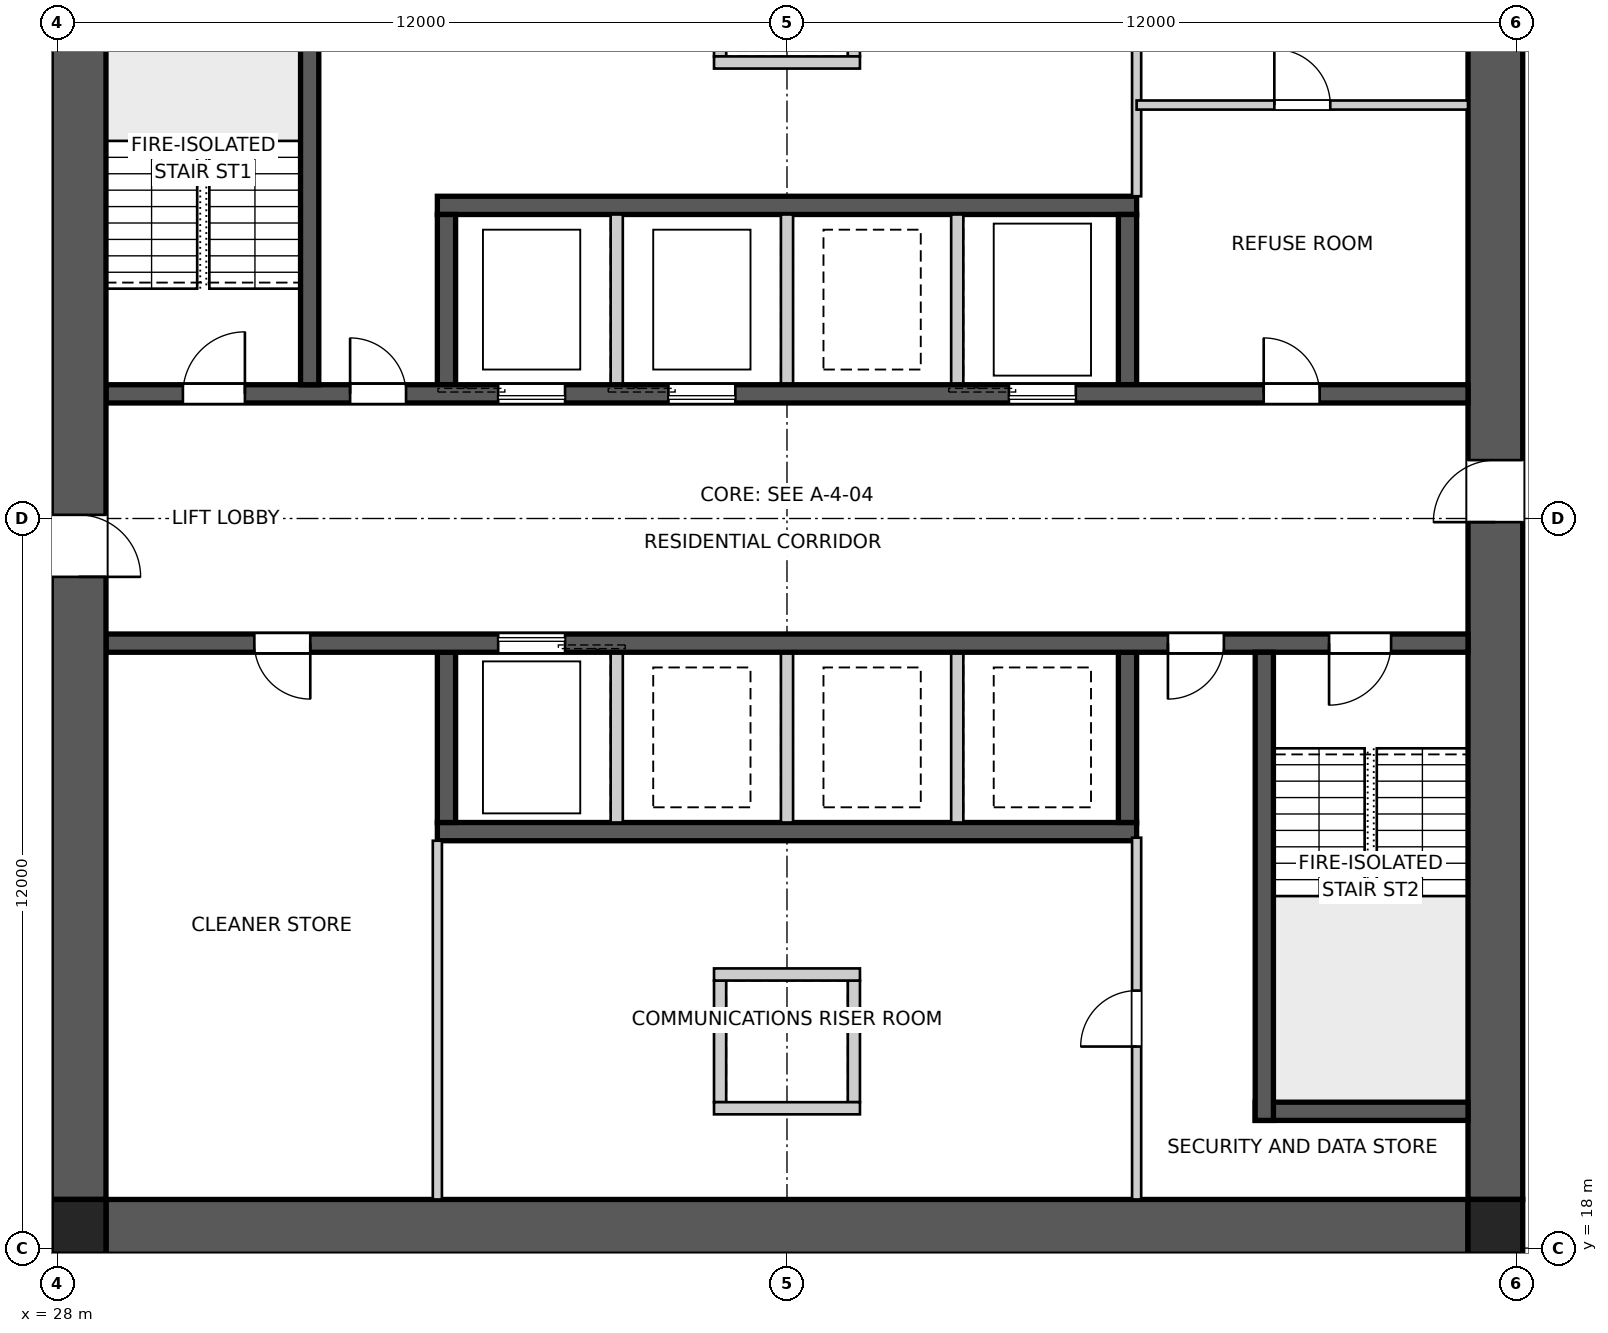
"""IFC4 building model, lengths in metres.
Left out: names, types, materials, properties, quantities, classifications, styles, units other than length and angle.
Written with IfcOpenShell. Run it as: python <this file> out.ifc"""

import sys

from ifc_helpers import new_model, si_unit, direction, frame, frame_2d, origin, origin_2d, place, context, subcontext, project, spatial, polyline, rectangle, outline, extrude, element, fill, save


model = new_model("IFC4")
c1 = context("Model", 3, precision=1e-05, world=origin(), true_north=direction((0.0, 1.0)))
c2 = subcontext(c1, "Body", "Model", "MODEL_VIEW")
j1 = project(units=[si_unit("LENGTHUNIT", "METRE"), si_unit("PLANEANGLEUNIT", "RADIAN")], contexts=[c1])
p1 = place(None, origin())
s1 = spatial("IfcSite", under=j1, at=p1, CompositionType="ELEMENT")
p2 = place(p1, origin())
s2 = spatial("IfcBuilding", under=s1, at=p2, CompositionType="ELEMENT")
p3 = place(p2, frame((0.0, 0.0, 54.0)))
s3 = spatial("IfcBuildingStorey", under=s2, at=p3, CompositionType="ELEMENT", Elevation=54.0)
p4 = place(p3, frame((51.2, 18.35, 0.0), z_axis=(0.0, 0.0, 1.0), x_axis=(-1.0, 0.0, 0.0)))
e1 = element("IfcWall", 1, at=p4, inside=s3, PredefinedType="SHEAR", context=c2, shape_type="SweptSolid", body=[
    extrude(outline(polyline([(0.0, -0.45), (22.4, -0.45), (22.4, -0.025), (22.85, -0.025), (22.85, 0.025), (22.4, 0.025), (22.4, 0.45), (0.0, 0.45), (0.0, 0.025), (-0.45, 0.025), (-0.45, -0.025), (0.0, -0.025), (0.0, -0.45)])), origin(), (0.0, 0.0, 1.0), 3.4),
])
p5 = place(p3, frame((51.65, 18.8, 0.0), z_axis=(0.0, 0.0, 1.0), x_axis=(0.0, 1.0, 0.0)))
e2 = element("IfcWall", 2, at=p5, inside=s3, PredefinedType="SHEAR", context=c2, shape_type="SweptSolid", body=[
    extrude(outline(polyline([(0.0, -0.45), (22.4, -0.45), (22.4, -0.025), (22.85, -0.025), (22.85, 0.025), (22.4, 0.025), (22.4, 0.45), (0.0, 0.45), (0.0, 0.025), (-0.45, 0.025), (-0.45, -0.025), (0.0, -0.025), (0.0, -0.45)])), origin(), (0.0, 0.0, 1.0), 3.4),
])
p6 = place(p5, frame((11.14, 0.0, 0.0)))
e3 = element("IfcOpeningElement", 3, at=p6, cuts=e2, PredefinedType="OPENING", context=c2, shape_type="SweptSolid", body=[
    extrude(rectangle(XDim=1.02, YDim=2.4, at=frame_2d((0.51, 1.2))), frame((0.0, 0.46, 0.0), z_axis=(0.0, -1.0, 0.0), x_axis=(1.0, 0.0, 0.0)), (0.0, 0.0, 1.0), 0.92),
])
p7 = place(p3, frame((28.35, 41.2, 0.0), z_axis=(0.0, 0.0, 1.0), x_axis=(0.0, -1.0, 0.0)))
e4 = element("IfcWall", 4, at=p7, inside=s3, PredefinedType="SHEAR", context=c2, shape_type="SweptSolid", body=[
    extrude(outline(polyline([(0.0, -0.45), (22.4, -0.45), (22.4, -0.025), (22.85, -0.025), (22.85, 0.025), (22.4, 0.025), (22.4, 0.45), (0.0, 0.45), (0.0, 0.025), (-0.45, 0.025), (-0.45, -0.025), (0.0, -0.025), (0.0, -0.45)])), origin(), (0.0, 0.0, 1.0), 3.4),
])
p8 = place(p7, frame((11.14, 0.0, 0.0)))
e5 = element("IfcOpeningElement", 5, at=p8, cuts=e4, PredefinedType="OPENING", context=c2, shape_type="SweptSolid", body=[
    extrude(rectangle(XDim=1.02, YDim=2.4, at=frame_2d((0.51, 1.2))), frame((0.0, 0.46, 0.0), z_axis=(0.0, -1.0, 0.0), x_axis=(1.0, 0.0, 0.0)), (0.0, 0.0, 1.0), 0.92),
])
p9 = place(p3, frame((28.8, 32.05, 0.0), z_axis=(0.0, 0.0, 1.0), x_axis=(1.0, 0.0, 0.0)))
e6 = element("IfcWall", 6, at=p9, inside=s3, PredefinedType="SHEAR", context=c2, shape_type="SweptSolid", body=[
    extrude(rectangle(XDim=22.4, YDim=0.3, at=frame_2d((11.2, 0.0))), origin(), (0.0, 0.0, 1.0), 3.4),
])
p10 = place(p9, frame((19.04, 0.0, 0.0)))
e7 = element("IfcOpeningElement", 7, at=p10, cuts=e6, PredefinedType="OPENING", context=c2, shape_type="SweptSolid", body=[
    extrude(rectangle(XDim=0.92, YDim=2.1, at=frame_2d((0.46, 1.05))), frame((0.0, 0.16, 0.0), z_axis=(0.0, -1.0, 0.0), x_axis=(1.0, 0.0, 0.0)), (0.0, 0.0, 1.0), 0.32),
])
p11 = place(p9, frame((1.265, 0.0, 0.0)))
e8 = element("IfcOpeningElement", 8, at=p11, cuts=e6, PredefinedType="OPENING", context=c2, shape_type="SweptSolid", body=[
    extrude(rectangle(XDim=1.02, YDim=2.1, at=frame_2d((0.51, 1.05))), frame((0.0, 0.16, 0.0), z_axis=(0.0, -1.0, 0.0), x_axis=(1.0, 0.0, 0.0)), (0.0, 0.0, 1.0), 0.32),
])
p12 = place(p9, frame((4.015, 0.0, 0.0)))
e9 = element("IfcOpeningElement", 9, at=p12, cuts=e6, PredefinedType="OPENING", context=c2, shape_type="SweptSolid", body=[
    extrude(rectangle(XDim=0.92, YDim=2.1, at=frame_2d((0.46, 1.05))), frame((0.0, 0.16, 0.0), z_axis=(0.0, -1.0, 0.0), x_axis=(1.0, 0.0, 0.0)), (0.0, 0.0, 1.0), 0.32),
])
p13 = place(p9, frame((6.45, 0.0, 0.0)))
e10 = element("IfcOpeningElement", 10, at=p13, cuts=e6, PredefinedType="OPENING", context=c2, shape_type="SweptSolid", body=[
    extrude(rectangle(XDim=1.1, YDim=2.1, at=frame_2d((0.55, 1.05))), frame((0.0, 0.16, 0.0), z_axis=(0.0, -1.0, 0.0), x_axis=(1.0, 0.0, 0.0)), (0.0, 0.0, 1.0), 0.32),
])
p14 = place(p9, frame((9.25, 0.0, 0.0)))
e11 = element("IfcOpeningElement", 11, at=p14, cuts=e6, PredefinedType="OPENING", context=c2, shape_type="SweptSolid", body=[
    extrude(rectangle(XDim=1.1, YDim=2.1, at=frame_2d((0.55, 1.05))), frame((0.0, 0.16, 0.0), z_axis=(0.0, -1.0, 0.0), x_axis=(1.0, 0.0, 0.0)), (0.0, 0.0, 1.0), 0.32),
])
p15 = place(p9, frame((14.85, 0.0, 0.0)))
e12 = element("IfcOpeningElement", 12, at=p15, cuts=e6, PredefinedType="OPENING", context=c2, shape_type="SweptSolid", body=[
    extrude(rectangle(XDim=1.1, YDim=2.1, at=frame_2d((0.55, 1.05))), frame((0.0, 0.16, 0.0), z_axis=(0.0, -1.0, 0.0), x_axis=(1.0, 0.0, 0.0)), (0.0, 0.0, 1.0), 0.32),
])
p16 = place(p3, frame((51.2, 27.95, 0.0), z_axis=(0.0, 0.0, 1.0), x_axis=(-1.0, 0.0, 0.0)))
e13 = element("IfcWall", 13, at=p16, inside=s3, PredefinedType="SHEAR", context=c2, shape_type="SweptSolid", body=[
    extrude(rectangle(XDim=22.4, YDim=0.3, at=frame_2d((11.2, 0.0))), origin(), (0.0, 0.0, 1.0), 3.4),
])
p17 = place(p16, frame((19.04, 0.0, 0.0)))
e14 = element("IfcOpeningElement", 14, at=p17, cuts=e13, PredefinedType="OPENING", context=c2, shape_type="SweptSolid", body=[
    extrude(rectangle(XDim=0.92, YDim=2.1, at=frame_2d((0.46, 1.05))), frame((0.0, 0.16, 0.0), z_axis=(0.0, -1.0, 0.0), x_axis=(1.0, 0.0, 0.0)), (0.0, 0.0, 1.0), 0.32),
])
p18 = place(p16, frame((1.265, 0.0, 0.0)))
e15 = element("IfcOpeningElement", 15, at=p18, cuts=e13, PredefinedType="OPENING", context=c2, shape_type="SweptSolid", body=[
    extrude(rectangle(XDim=1.02, YDim=2.1, at=frame_2d((0.51, 1.05))), frame((0.0, 0.16, 0.0), z_axis=(0.0, -1.0, 0.0), x_axis=(1.0, 0.0, 0.0)), (0.0, 0.0, 1.0), 0.32),
])
p19 = place(p16, frame((4.015, 0.0, 0.0)))
e16 = element("IfcOpeningElement", 16, at=p19, cuts=e13, PredefinedType="OPENING", context=c2, shape_type="SweptSolid", body=[
    extrude(rectangle(XDim=0.92, YDim=2.1, at=frame_2d((0.46, 1.05))), frame((0.0, 0.16, 0.0), z_axis=(0.0, -1.0, 0.0), x_axis=(1.0, 0.0, 0.0)), (0.0, 0.0, 1.0), 0.32),
])
p20 = place(p16, frame((14.85, 0.0, 0.0)))
e17 = element("IfcOpeningElement", 17, at=p20, cuts=e13, PredefinedType="OPENING", context=c2, shape_type="SweptSolid", body=[
    extrude(rectangle(XDim=1.1, YDim=2.1, at=frame_2d((0.55, 1.05))), frame((0.0, 0.16, 0.0), z_axis=(0.0, -1.0, 0.0), x_axis=(1.0, 0.0, 0.0)), (0.0, 0.0, 1.0), 0.32),
])
for number, where, z_axis, x_axis in (
    (18, (34.25, 35.15, 0.0), (0.0, 0.0, 1.0), (1.0, 0.0, 0.0)),
    (19, (45.75, 24.85, 0.0), (0.0, 0.0, 1.0), (-1.0, 0.0, 0.0)),
):
    element("IfcWall", number, at=place(p3, frame(where, z_axis=z_axis, x_axis=x_axis)), inside=s3, PredefinedType="SHEAR", context=c2, shape_type="SweptSolid", body=[
        extrude(rectangle(XDim=11.5, YDim=0.3, at=frame_2d((5.75, 0.0))), origin(), (0.0, 0.0, 1.0), 3.4),
    ])
for number, where, z_axis, x_axis in (
    (20, (34.4, 32.2, 0.0), (0.0, 0.0, 1.0), (0.0, 1.0, 0.0)),
    (21, (45.6, 27.8, 0.0), (0.0, 0.0, 1.0), (0.0, -1.0, 0.0)),
):
    element("IfcWall", number, at=place(p3, frame(where, z_axis=z_axis, x_axis=x_axis)), inside=s3, PredefinedType="SHEAR", context=c2, shape_type="SweptSolid", body=[
        extrude(rectangle(XDim=2.8, YDim=0.3, at=frame_2d((1.4, 0.0))), origin(), (0.0, 0.0, 1.0), 3.4),
    ])
for number, where, z_axis, x_axis in (
    (22, (37.2, 32.2, 0.0), (0.0, 0.0, 1.0), (0.0, 1.0, 0.0)),
    (23, (42.8, 27.8, 0.0), (0.0, 0.0, 1.0), (0.0, -1.0, 0.0)),
    (24, (40.0, 32.2, 0.0), (0.0, 0.0, 1.0), (0.0, 1.0, 0.0)),
    (25, (40.0, 27.8, 0.0), (0.0, 0.0, 1.0), (0.0, -1.0, 0.0)),
    (26, (42.8, 32.2, 0.0), (0.0, 0.0, 1.0), (0.0, 1.0, 0.0)),
    (27, (37.2, 27.8, 0.0), (0.0, 0.0, 1.0), (0.0, -1.0, 0.0)),
):
    element("IfcWall", number, at=place(p3, frame(where, z_axis=z_axis, x_axis=x_axis)), inside=s3, PredefinedType="SOLIDWALL", context=c2, shape_type="SweptSolid", body=[
        extrude(rectangle(XDim=2.8, YDim=0.2, at=frame_2d((1.4, 0.0))), origin(), (0.0, 0.0, 1.0), 3.4),
    ])
for number, where, z_axis, x_axis in (
    (28, (45.6, 32.2, 0.0), (0.0, 0.0, 1.0), (0.0, 1.0, 0.0)),
    (29, (34.4, 27.8, 0.0), (0.0, 0.0, 1.0), (0.0, -1.0, 0.0)),
):
    element("IfcWall", number, at=place(p3, frame(where, z_axis=z_axis, x_axis=x_axis)), inside=s3, PredefinedType="SHEAR", context=c2, shape_type="SweptSolid", body=[
        extrude(rectangle(XDim=2.8, YDim=0.3, at=frame_2d((1.4, 0.0))), origin(), (0.0, 0.0, 1.0), 3.4),
    ])
for number, where, z_axis, x_axis in (
    (30, (32.15, 32.2, 0.0), (0.0, 0.0, 1.0), (0.0, 1.0, 0.0)),
    (31, (47.85, 27.8, 0.0), (0.0, 0.0, 1.0), (0.0, -1.0, 0.0)),
):
    element("IfcWall", number, at=place(p3, frame(where, z_axis=z_axis, x_axis=x_axis)), inside=s3, PredefinedType="SHEAR", context=c2, shape_type="SweptSolid", body=[
        extrude(rectangle(XDim=7.7, YDim=0.3, at=frame_2d((3.85, 0.0))), origin(), (0.0, 0.0, 1.0), 3.4),
    ])
p21 = place(p3, frame((51.2, 20.25, 0.0), z_axis=(0.0, 0.0, 1.0), x_axis=(-1.0, 0.0, 0.0)))
e32 = element("IfcWall", 32, at=p21, inside=s3, PredefinedType="SHEAR", context=c2, shape_type="SweptSolid", body=[
    extrude(rectangle(XDim=3.5, YDim=0.3, at=frame_2d((1.75, 0.0))), origin(), (0.0, 0.0, 1.0), 3.4),
])
for number, where, z_axis, x_axis in (
    (33, (38.9, 37.6, 0.0), (0.0, 0.0, 1.0), (0.0, 1.0, 0.0)),
    (34, (41.1, 37.6, 0.0), (0.0, 0.0, 1.0), (0.0, 1.0, 0.0)),
):
    element("IfcWall", number, at=place(p3, frame(where, z_axis=z_axis, x_axis=x_axis)), inside=s3, PredefinedType="SOLIDWALL", context=c2, shape_type="SweptSolid", body=[
        extrude(rectangle(XDim=2.0, YDim=0.2, at=frame_2d((1.0, 0.0))), origin(), (0.0, 0.0, 1.0), 3.4),
    ])
p22 = place(p3, frame((38.8, 37.5, 0.0), z_axis=(0.0, 0.0, 1.0), x_axis=(1.0, 0.0, 0.0)))
e35 = element("IfcWall", 35, at=p22, inside=s3, PredefinedType="SOLIDWALL", context=c2, shape_type="SweptSolid", body=[
    extrude(rectangle(XDim=2.4, YDim=0.2, at=frame_2d((1.2, 0.0))), origin(), (0.0, 0.0, 1.0), 3.4),
])
for number, where, z_axis, x_axis in (
    (36, (38.9, 22.4, 0.0), (0.0, 0.0, 1.0), (0.0, -1.0, 0.0)),
    (37, (41.1, 22.4, 0.0), (0.0, 0.0, 1.0), (0.0, -1.0, 0.0)),
):
    element("IfcWall", number, at=place(p3, frame(where, z_axis=z_axis, x_axis=x_axis)), inside=s3, PredefinedType="SOLIDWALL", context=c2, shape_type="SweptSolid", body=[
        extrude(rectangle(XDim=2.0, YDim=0.2, at=frame_2d((1.0, 0.0))), origin(), (0.0, 0.0, 1.0), 3.4),
    ])
for number, where, z_axis, x_axis in (
    (38, (38.8, 22.5, 0.0), (0.0, 0.0, 1.0), (1.0, 0.0, 0.0)),
    (39, (38.8, 20.3, 0.0), (0.0, 0.0, 1.0), (1.0, 0.0, 0.0)),
):
    element("IfcWall", number, at=place(p3, frame(where, z_axis=z_axis, x_axis=x_axis)), inside=s3, PredefinedType="SOLIDWALL", context=c2, shape_type="SweptSolid", body=[
        extrude(rectangle(XDim=2.4, YDim=0.2, at=frame_2d((1.2, 0.0))), origin(), (0.0, 0.0, 1.0), 3.4),
    ])
for number, where, z_axis, x_axis in (
    (40, (28.35, 18.35, 0.0), (0.0, 0.0, 1.0), (1.0, 0.0, 0.0)),
    (41, (51.65, 18.35, 0.0), (0.0, 0.0, 1.0), (1.0, 0.0, 0.0)),
):
    element("IfcColumn", number, at=place(p3, frame(where, z_axis=z_axis, x_axis=x_axis)), inside=s3, PredefinedType="COLUMN", context=c2, shape_type="SweptSolid", body=[
        extrude(rectangle(XDim=0.9, YDim=0.9, at=origin_2d()), origin(), (0.0, 0.0, 1.0), 3.4),
    ])
p23 = place(p3, frame((45.75, 41.2, 0.0), z_axis=(0.0, 0.0, 1.0), x_axis=(0.0, -1.0, 0.0)))
e42 = element("IfcWall", 42, at=p23, inside=s3, PredefinedType="SOLIDWALL", context=c2, shape_type="SweptSolid", body=[
    extrude(rectangle(XDim=5.9, YDim=0.15, at=frame_2d((2.95, 0.0))), origin(), (0.0, 0.0, 1.0), 3.25),
])
p24 = place(p3, frame((45.75, 36.8, 0.0), z_axis=(0.0, 0.0, 1.0), x_axis=(1.0, 0.0, 0.0)))
e43 = element("IfcWall", 43, at=p24, inside=s3, PredefinedType="SOLIDWALL", context=c2, shape_type="SweptSolid", body=[
    extrude(rectangle(XDim=5.45, YDim=0.15, at=frame_2d((2.725, 0.0))), origin(), (0.0, 0.0, 1.0), 3.25),
])
p25 = place(p24, frame((2.265, 0.0, 0.0)))
e44 = element("IfcOpeningElement", 44, at=p25, cuts=e43, PredefinedType="OPENING", context=c2, shape_type="SweptSolid", body=[
    extrude(rectangle(XDim=0.92, YDim=2.1, at=frame_2d((0.46, 1.05))), frame((0.0, 0.085, 0.0), z_axis=(0.0, -1.0, 0.0), x_axis=(1.0, 0.0, 0.0)), (0.0, 0.0, 1.0), 0.17),
])
p26 = place(p3, frame((45.75, 18.8, 0.0), z_axis=(0.0, 0.0, 1.0), x_axis=(0.0, 1.0, 0.0)))
e45 = element("IfcWall", 45, at=p26, inside=s3, PredefinedType="SOLIDWALL", context=c2, shape_type="SweptSolid", body=[
    extrude(rectangle(XDim=5.95, YDim=0.15, at=frame_2d((2.975, 0.0))), origin(), (0.0, 0.0, 1.0), 3.25),
])
p27 = place(p26, frame((2.515, 0.0, 0.0)))
e46 = element("IfcOpeningElement", 46, at=p27, cuts=e45, PredefinedType="OPENING", context=c2, shape_type="SweptSolid", body=[
    extrude(rectangle(XDim=0.92, YDim=2.1, at=frame_2d((0.46, 1.05))), frame((0.0, 0.085, 0.0), z_axis=(0.0, -1.0, 0.0), x_axis=(1.0, 0.0, 0.0)), (0.0, 0.0, 1.0), 0.17),
])
p28 = place(p3, frame((34.25, 18.8, 0.0), z_axis=(0.0, 0.0, 1.0), x_axis=(0.0, 1.0, 0.0)))
e47 = element("IfcWall", 47, at=p28, inside=s3, PredefinedType="SOLIDWALL", context=c2, shape_type="SweptSolid", body=[
    extrude(rectangle(XDim=5.9, YDim=0.15, at=frame_2d((2.95, 0.0))), origin(), (0.0, 0.0, 1.0), 3.25),
])
p29 = place(p10, origin())
e48 = element("IfcDoor", 48, at=p29, inside=s3, OperationType="SINGLE_SWING_LEFT", PredefinedType="DOOR", context=c2, shape_type="SweptSolid", body=[
    extrude(rectangle(XDim=0.92, YDim=2.1, at=frame_2d((0.46, 1.05))), frame((0.0, 0.025, 0.0), z_axis=(0.0, -1.0, 0.0), x_axis=(1.0, 0.0, 0.0)), (0.0, 0.0, 1.0), 0.05),
])
fill(e7, e48)
p30 = place(p17, origin())
e49 = element("IfcDoor", 49, at=p30, inside=s3, OperationType="SINGLE_SWING_LEFT", PredefinedType="DOOR", context=c2, shape_type="SweptSolid", body=[
    extrude(rectangle(XDim=0.92, YDim=2.1, at=frame_2d((0.46, 1.05))), frame((0.0, 0.025, 0.0), z_axis=(0.0, -1.0, 0.0), x_axis=(1.0, 0.0, 0.0)), (0.0, 0.0, 1.0), 0.05),
])
fill(e14, e49)
p31 = place(p18, origin())
e50 = element("IfcDoor", 50, at=p31, inside=s3, OperationType="SINGLE_SWING_RIGHT", PredefinedType="DOOR", context=c2, shape_type="SweptSolid", body=[
    extrude(rectangle(XDim=1.02, YDim=2.1, at=frame_2d((0.51, 1.05))), frame((0.0, 0.025, 0.0), z_axis=(0.0, -1.0, 0.0), x_axis=(1.0, 0.0, 0.0)), (0.0, 0.0, 1.0), 0.05),
])
fill(e15, e50)
p32 = place(p11, origin())
e51 = element("IfcDoor", 51, at=p32, inside=s3, OperationType="SINGLE_SWING_RIGHT", PredefinedType="DOOR", context=c2, shape_type="SweptSolid", body=[
    extrude(rectangle(XDim=1.02, YDim=2.1, at=frame_2d((0.51, 1.05))), frame((0.0, 0.025, 0.0), z_axis=(0.0, -1.0, 0.0), x_axis=(1.0, 0.0, 0.0)), (0.0, 0.0, 1.0), 0.05),
])
fill(e8, e51)
p33 = place(p12, origin())
e52 = element("IfcDoor", 52, at=p33, inside=s3, OperationType="SINGLE_SWING_LEFT", PredefinedType="DOOR", context=c2, shape_type="SweptSolid", body=[
    extrude(rectangle(XDim=0.92, YDim=2.1, at=frame_2d((0.46, 1.05))), frame((0.0, 0.025, 0.0), z_axis=(0.0, -1.0, 0.0), x_axis=(1.0, 0.0, 0.0)), (0.0, 0.0, 1.0), 0.05),
])
fill(e9, e52)
p34 = place(p19, origin())
e53 = element("IfcDoor", 53, at=p34, inside=s3, OperationType="SINGLE_SWING_RIGHT", PredefinedType="DOOR", context=c2, shape_type="SweptSolid", body=[
    extrude(rectangle(XDim=0.92, YDim=2.1, at=frame_2d((0.46, 1.05))), frame((0.0, 0.025, 0.0), z_axis=(0.0, -1.0, 0.0), x_axis=(1.0, 0.0, 0.0)), (0.0, 0.0, 1.0), 0.05),
])
fill(e16, e53)
p35 = place(p25, origin())
e54 = element("IfcDoor", 54, at=p35, inside=s3, OperationType="SINGLE_SWING_LEFT", PredefinedType="DOOR", context=c2, shape_type="SweptSolid", body=[
    extrude(rectangle(XDim=0.92, YDim=2.1, at=frame_2d((0.46, 1.05))), frame((0.0, 0.025, 0.0), z_axis=(0.0, -1.0, 0.0), x_axis=(1.0, 0.0, 0.0)), (0.0, 0.0, 1.0), 0.05),
])
fill(e44, e54)
p36 = place(p27, origin())
e55 = element("IfcDoor", 55, at=p36, inside=s3, OperationType="SINGLE_SWING_LEFT", PredefinedType="DOOR", context=c2, shape_type="SweptSolid", body=[
    extrude(rectangle(XDim=0.92, YDim=2.1, at=frame_2d((0.46, 1.05))), frame((0.0, 0.025, 0.0), z_axis=(0.0, -1.0, 0.0), x_axis=(1.0, 0.0, 0.0)), (0.0, 0.0, 1.0), 0.05),
])
fill(e46, e55)
p37 = place(p6, origin())
e56 = element("IfcDoor", 56, at=p37, inside=s3, OperationType="SINGLE_SWING_LEFT", PredefinedType="DOOR", context=c2, shape_type="SweptSolid", body=[
    extrude(rectangle(XDim=1.02, YDim=2.4, at=frame_2d((0.51, 1.2))), frame((0.0, 0.025, 0.0), z_axis=(0.0, -1.0, 0.0), x_axis=(1.0, 0.0, 0.0)), (0.0, 0.0, 1.0), 0.05),
])
fill(e3, e56)
p38 = place(p8, origin())
e57 = element("IfcDoor", 57, at=p38, inside=s3, OperationType="SINGLE_SWING_RIGHT", PredefinedType="DOOR", context=c2, shape_type="SweptSolid", body=[
    extrude(rectangle(XDim=1.02, YDim=2.4, at=frame_2d((0.51, 1.2))), frame((0.0, 0.025, 0.0), z_axis=(0.0, -1.0, 0.0), x_axis=(1.0, 0.0, 0.0)), (0.0, 0.0, 1.0), 0.05),
])
fill(e5, e57)
p39 = place(p13, origin())
e58 = element("IfcDoor", 58, at=p39, inside=s3, OperationType="SLIDING_TO_LEFT", PredefinedType="DOOR", context=c2, shape_type="SweptSolid", body=[
    extrude(rectangle(XDim=1.1, YDim=2.1, at=frame_2d((0.55, 1.05))), frame((0.0, 0.025, 0.0), z_axis=(0.0, -1.0, 0.0), x_axis=(1.0, 0.0, 0.0)), (0.0, 0.0, 1.0), 0.05),
])
fill(e10, e58)
p40 = place(p14, origin())
e59 = element("IfcDoor", 59, at=p40, inside=s3, OperationType="SLIDING_TO_LEFT", PredefinedType="DOOR", context=c2, shape_type="SweptSolid", body=[
    extrude(rectangle(XDim=1.1, YDim=2.1, at=frame_2d((0.55, 1.05))), frame((0.0, 0.025, 0.0), z_axis=(0.0, -1.0, 0.0), x_axis=(1.0, 0.0, 0.0)), (0.0, 0.0, 1.0), 0.05),
])
fill(e11, e59)
p41 = place(p15, origin())
e60 = element("IfcDoor", 60, at=p41, inside=s3, OperationType="SLIDING_TO_LEFT", PredefinedType="DOOR", context=c2, shape_type="SweptSolid", body=[
    extrude(rectangle(XDim=1.1, YDim=2.1, at=frame_2d((0.55, 1.05))), frame((0.0, 0.025, 0.0), z_axis=(0.0, -1.0, 0.0), x_axis=(1.0, 0.0, 0.0)), (0.0, 0.0, 1.0), 0.05),
])
fill(e12, e60)
p42 = place(p20, origin())
e61 = element("IfcDoor", 61, at=p42, inside=s3, OperationType="SLIDING_TO_LEFT", PredefinedType="DOOR", context=c2, shape_type="SweptSolid", body=[
    extrude(rectangle(XDim=1.1, YDim=2.1, at=frame_2d((0.55, 1.05))), frame((0.0, 0.025, 0.0), z_axis=(0.0, -1.0, 0.0), x_axis=(1.0, 0.0, 0.0)), (0.0, 0.0, 1.0), 0.05),
])
fill(e17, e61)
save(model, sys.argv[1])
